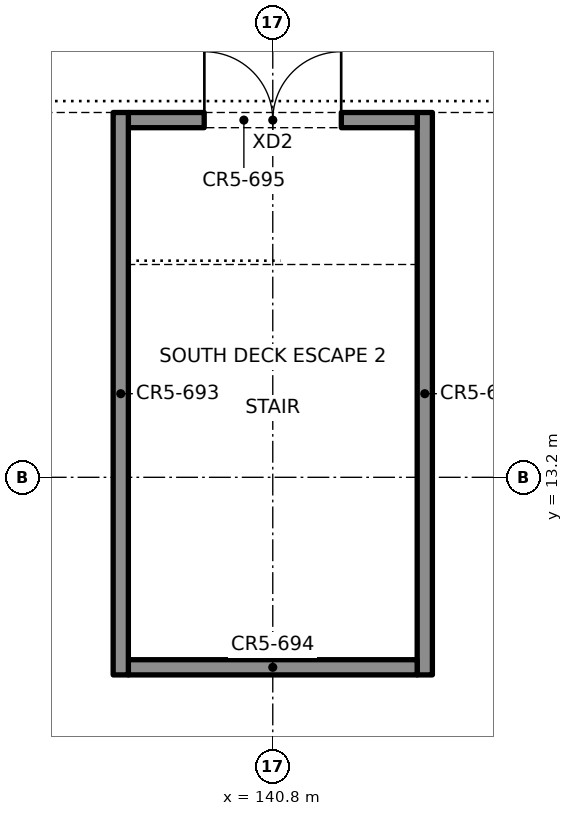
"""IFC4 building model, lengths in metres.
Left out: names, types, materials, properties, quantities, classifications, styles, units other than length and angle.
Written with IfcOpenShell. Run it as: python <this file> out.ifc"""

import sys

from ifc_helpers import new_model, si_unit, direction, frame, frame_2d, origin, place, context, subcontext, project, spatial, rectangle, extrude, element, fill, save


model = new_model("IFC4")
c1 = context("Model", 3, precision=1e-05, world=origin(), true_north=direction((0.0, 1.0)))
c2 = subcontext(c1, "Body", "Model", "MODEL_VIEW")
j1 = project(units=[si_unit("LENGTHUNIT", "METRE"), si_unit("PLANEANGLEUNIT", "RADIAN")], contexts=[c1])
p1 = place(None, origin())
s1 = spatial("IfcSite", under=j1, at=p1, CompositionType="ELEMENT")
p2 = place(p1, origin())
s2 = spatial("IfcBuilding", under=s1, at=p2, CompositionType="ELEMENT")
p3 = place(p2, frame((0.0, 0.0, 14.0)))
s3 = spatial("IfcBuildingStorey", under=s2, at=p3, CompositionType="ELEMENT", Elevation=14.0)
for number, where, z_axis, x_axis in (
    (1, (138.8, 10.6, 0.0), (0.0, 0.0, 1.0), (0.0, 1.0, 0.0)),
    (2, (142.8, 18.0, 0.0), (0.0, 0.0, 1.0), (0.0, -1.0, 0.0)),
):
    element("IfcWall", number, at=place(p3, frame(where, z_axis=z_axis, x_axis=x_axis)), inside=s3, PredefinedType="SOLIDWALL", context=c2, shape_type="SweptSolid", body=[
        extrude(rectangle(XDim=7.4, YDim=0.2, at=frame_2d((3.7, 0.0))), origin(), (0.0, 0.0, 1.0), 3.0),
    ])
p4 = place(p3, frame((138.9, 10.7, 0.0), z_axis=(0.0, 0.0, 1.0), x_axis=(1.0, 0.0, 0.0)))
e3 = element("IfcWall", 3, at=p4, inside=s3, PredefinedType="SOLIDWALL", context=c2, shape_type="SweptSolid", body=[
    extrude(rectangle(XDim=3.8, YDim=0.2, at=frame_2d((1.9, 0.0))), origin(), (0.0, 0.0, 1.0), 3.0),
])
p5 = place(p3, frame((138.9, 17.9, 0.0), z_axis=(0.0, 0.0, 1.0), x_axis=(1.0, 0.0, 0.0)))
e4 = element("IfcWall", 4, at=p5, inside=s3, PredefinedType="SOLIDWALL", context=c2, shape_type="SweptSolid", body=[
    extrude(rectangle(XDim=3.8, YDim=0.2, at=frame_2d((1.9, 0.0))), origin(), (0.0, 0.0, 1.0), 3.0),
])
p6 = place(p5, frame((1.0, 0.0, 0.0)))
e5 = element("IfcOpeningElement", 5, at=p6, cuts=e4, PredefinedType="OPENING", context=c2, shape_type="SweptSolid", body=[
    extrude(rectangle(XDim=1.8, YDim=2.1, at=frame_2d((0.9, 1.05))), frame((0.0, 0.11, 0.0), z_axis=(0.0, -1.0, 0.0), x_axis=(1.0, 0.0, 0.0)), (0.0, 0.0, 1.0), 0.22),
])
p7 = place(p6, origin())
e6 = element("IfcDoor", 6, at=p7, inside=s3, OperationType="DOUBLE_DOOR_SINGLE_SWING", PredefinedType="DOOR", context=c2, shape_type="SweptSolid", body=[
    extrude(rectangle(XDim=1.8, YDim=2.1, at=frame_2d((0.9, 1.05))), frame((0.0, 0.025, 0.0), z_axis=(0.0, -1.0, 0.0), x_axis=(1.0, 0.0, 0.0)), (0.0, 0.0, 1.0), 0.05),
])
fill(e5, e6)
save(model, sys.argv[1])
